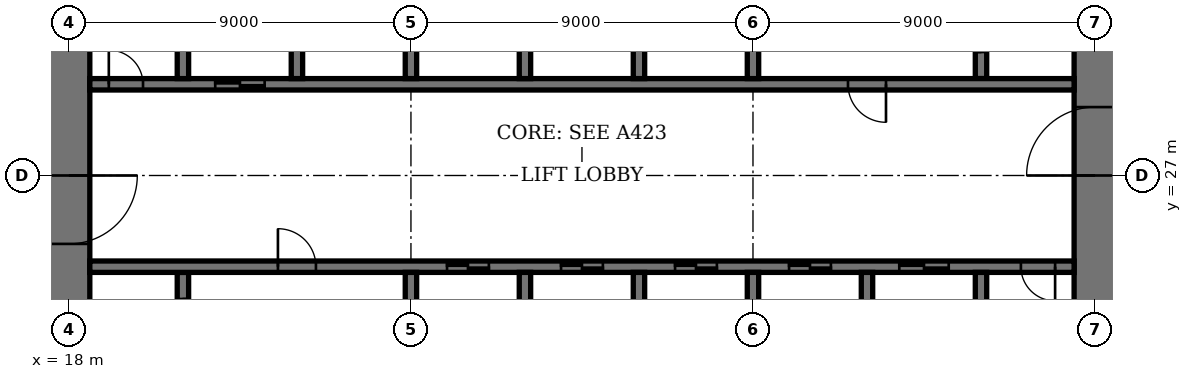
"""IFC4 building model, lengths in metres.
Left out: names, types, materials, properties, quantities, classifications, styles, units other than length and angle.
Written with IfcOpenShell. Run it as: python <this file> out.ifc"""

import sys

from ifc_helpers import new_model, si_unit, direction, frame, frame_2d, origin, place, context, subcontext, project, spatial, rectangle, extrude, element, fill, save


model = new_model("IFC4")
c1 = context("Model", 3, precision=1e-05, world=origin(), true_north=direction((0.0, 1.0)))
c2 = subcontext(c1, "Body", "Model", "MODEL_VIEW")
j1 = project(units=[si_unit("LENGTHUNIT", "METRE"), si_unit("PLANEANGLEUNIT", "RADIAN")], contexts=[c1])
p1 = place(None, origin())
s1 = spatial("IfcSite", under=j1, at=p1, CompositionType="ELEMENT")
p2 = place(p1, origin())
s2 = spatial("IfcBuilding", under=s1, at=p2, CompositionType="ELEMENT")
p3 = place(p2, frame((0.0, 0.0, 5.4)))
s3 = spatial("IfcBuildingStorey", under=s2, at=p3, CompositionType="ELEMENT", Elevation=5.4)
p4 = place(p3, frame((18.0, 35.45, 0.0), z_axis=(0.0, 0.0, 1.0), x_axis=(0.0, -1.0, 0.0)))
e1 = element("IfcWall", 1, at=p4, inside=s3, PredefinedType="SHEAR", context=c2, shape_type="SweptSolid", body=[
    extrude(rectangle(XDim=16.9, YDim=1.1, at=frame_2d((8.45, 0.0))), origin(), (0.0, 0.0, 1.0), 5.4),
])
p5 = place(p4, frame((8.45, 0.0, 0.0)))
e2 = element("IfcOpeningElement", 2, at=p5, cuts=e1, PredefinedType="OPENING", context=c2, shape_type="SweptSolid", body=[
    extrude(rectangle(XDim=1.8, YDim=2.4, at=frame_2d((0.9, 1.2))), frame((0.0, 0.56, 0.0), z_axis=(0.0, -1.0, 0.0), x_axis=(1.0, 0.0, 0.0)), (0.0, 0.0, 1.0), 1.12),
])
p6 = place(p3, frame((45.0, 18.55, 0.0), z_axis=(0.0, 0.0, 1.0), x_axis=(0.0, 1.0, 0.0)))
e3 = element("IfcWall", 3, at=p6, inside=s3, PredefinedType="SHEAR", context=c2, shape_type="SweptSolid", body=[
    extrude(rectangle(XDim=16.9, YDim=1.1, at=frame_2d((8.45, 0.0))), origin(), (0.0, 0.0, 1.0), 5.4),
])
p7 = place(p6, frame((8.45, 0.0, 0.0)))
e4 = element("IfcOpeningElement", 4, at=p7, cuts=e3, PredefinedType="OPENING", context=c2, shape_type="SweptSolid", body=[
    extrude(rectangle(XDim=1.8, YDim=2.4, at=frame_2d((0.9, 1.2))), frame((0.0, 0.56, 0.0), z_axis=(0.0, -1.0, 0.0), x_axis=(1.0, 0.0, 0.0)), (0.0, 0.0, 1.0), 1.12),
])
p8 = place(p3, frame((21.0, 21.95, 0.0), z_axis=(0.0, 0.0, 1.0), x_axis=(0.0, 1.0, 0.0)))
e5 = element("IfcWall", 5, at=p8, inside=s3, PredefinedType="SHEAR", context=c2, shape_type="SweptSolid", body=[
    extrude(rectangle(XDim=2.5, YDim=0.3, at=frame_2d((1.25, 0.0))), origin(), (0.0, 0.0, 1.0), 5.4),
])
p9 = place(p8, frame((0.7, 0.0, 0.0)))
e6 = element("IfcOpeningElement", 6, at=p9, cuts=e5, PredefinedType="OPENING", context=c2, shape_type="SweptSolid", body=[
    extrude(rectangle(XDim=1.1, YDim=2.4, at=frame_2d((0.55, 1.2))), frame((0.0, 0.16, 0.0), z_axis=(0.0, -1.0, 0.0), x_axis=(1.0, 0.0, 0.0)), (0.0, 0.0, 1.0), 0.32),
])
p10 = place(p3, frame((42.0, 29.55, 0.0), z_axis=(0.0, 0.0, 1.0), x_axis=(0.0, 1.0, 0.0)))
e7 = element("IfcWall", 7, at=p10, inside=s3, PredefinedType="SHEAR", context=c2, shape_type="SweptSolid", body=[
    extrude(rectangle(XDim=2.5, YDim=0.3, at=frame_2d((1.25, 0.0))), origin(), (0.0, 0.0, 1.0), 5.4),
])
p11 = place(p10, frame((0.7, 0.0, 0.0)))
e8 = element("IfcOpeningElement", 8, at=p11, cuts=e7, PredefinedType="OPENING", context=c2, shape_type="SweptSolid", body=[
    extrude(rectangle(XDim=1.1, YDim=2.4, at=frame_2d((0.55, 1.2))), frame((0.0, 0.16, 0.0), z_axis=(0.0, -1.0, 0.0), x_axis=(1.0, 0.0, 0.0)), (0.0, 0.0, 1.0), 0.32),
])
p12 = place(p3, frame((18.55, 24.6, 0.0), z_axis=(0.0, 0.0, 1.0), x_axis=(1.0, 0.0, 0.0)))
e9 = element("IfcWall", 9, at=p12, inside=s3, PredefinedType="SHEAR", context=c2, shape_type="SweptSolid", body=[
    extrude(rectangle(XDim=25.9, YDim=0.3, at=frame_2d((12.95, 0.0))), origin(), (0.0, 0.0, 1.0), 5.4),
])
p13 = place(p12, frame((4.95, 0.0, 0.0)))
e10 = element("IfcOpeningElement", 10, at=p13, cuts=e9, PredefinedType="OPENING", context=c2, shape_type="SweptSolid", body=[
    extrude(rectangle(XDim=1.0, YDim=2.4, at=frame_2d((0.5, 1.2))), frame((0.0, 0.16, 0.0), z_axis=(0.0, -1.0, 0.0), x_axis=(1.0, 0.0, 0.0)), (0.0, 0.0, 1.0), 0.32),
])
p14 = place(p12, frame((24.5, 0.0, 0.0)))
e11 = element("IfcOpeningElement", 11, at=p14, cuts=e9, PredefinedType="OPENING", context=c2, shape_type="SweptSolid", body=[
    extrude(rectangle(XDim=0.9, YDim=2.1, at=frame_2d((0.45, 1.05))), frame((0.0, 0.16, 0.0), z_axis=(0.0, -1.0, 0.0), x_axis=(1.0, 0.0, 0.0)), (0.0, 0.0, 1.0), 0.32),
])
p15 = place(p12, frame((9.4, 0.0, 0.0)))
e12 = element("IfcOpeningElement", 12, at=p15, cuts=e9, PredefinedType="OPENING", context=c2, shape_type="SweptSolid", body=[
    extrude(rectangle(XDim=1.1, YDim=2.4, at=frame_2d((0.55, 1.2))), frame((0.0, 0.16, 0.0), z_axis=(0.0, -1.0, 0.0), x_axis=(1.0, 0.0, 0.0)), (0.0, 0.0, 1.0), 0.32),
])
p16 = place(p12, frame((12.4, 0.0, 0.0)))
e13 = element("IfcOpeningElement", 13, at=p16, cuts=e9, PredefinedType="OPENING", context=c2, shape_type="SweptSolid", body=[
    extrude(rectangle(XDim=1.1, YDim=2.4, at=frame_2d((0.55, 1.2))), frame((0.0, 0.16, 0.0), z_axis=(0.0, -1.0, 0.0), x_axis=(1.0, 0.0, 0.0)), (0.0, 0.0, 1.0), 0.32),
])
p17 = place(p12, frame((15.4, 0.0, 0.0)))
e14 = element("IfcOpeningElement", 14, at=p17, cuts=e9, PredefinedType="OPENING", context=c2, shape_type="SweptSolid", body=[
    extrude(rectangle(XDim=1.1, YDim=2.4, at=frame_2d((0.55, 1.2))), frame((0.0, 0.16, 0.0), z_axis=(0.0, -1.0, 0.0), x_axis=(1.0, 0.0, 0.0)), (0.0, 0.0, 1.0), 0.32),
])
p18 = place(p12, frame((18.4, 0.0, 0.0)))
e15 = element("IfcOpeningElement", 15, at=p18, cuts=e9, PredefinedType="OPENING", context=c2, shape_type="SweptSolid", body=[
    extrude(rectangle(XDim=1.1, YDim=2.4, at=frame_2d((0.55, 1.2))), frame((0.0, 0.16, 0.0), z_axis=(0.0, -1.0, 0.0), x_axis=(1.0, 0.0, 0.0)), (0.0, 0.0, 1.0), 0.32),
])
p19 = place(p12, frame((21.3, 0.0, 0.0)))
e16 = element("IfcOpeningElement", 16, at=p19, cuts=e9, PredefinedType="OPENING", context=c2, shape_type="SweptSolid", body=[
    extrude(rectangle(XDim=1.3, YDim=2.4, at=frame_2d((0.65, 1.2))), frame((0.0, 0.16, 0.0), z_axis=(0.0, -1.0, 0.0), x_axis=(1.0, 0.0, 0.0)), (0.0, 0.0, 1.0), 0.32),
])
p20 = place(p3, frame((18.55, 29.4, 0.0), z_axis=(0.0, 0.0, 1.0), x_axis=(1.0, 0.0, 0.0)))
e17 = element("IfcWall", 17, at=p20, inside=s3, PredefinedType="SHEAR", context=c2, shape_type="SweptSolid", body=[
    extrude(rectangle(XDim=25.9, YDim=0.3, at=frame_2d((12.95, 0.0))), origin(), (0.0, 0.0, 1.0), 5.4),
])
p21 = place(p20, frame((19.95, 0.0, 0.0)))
e18 = element("IfcOpeningElement", 18, at=p21, cuts=e17, PredefinedType="OPENING", context=c2, shape_type="SweptSolid", body=[
    extrude(rectangle(XDim=1.0, YDim=2.4, at=frame_2d((0.5, 1.2))), frame((0.0, 0.16, 0.0), z_axis=(0.0, -1.0, 0.0), x_axis=(1.0, 0.0, 0.0)), (0.0, 0.0, 1.0), 0.32),
])
p22 = place(p20, frame((0.5, 0.0, 0.0)))
e19 = element("IfcOpeningElement", 19, at=p22, cuts=e17, PredefinedType="OPENING", context=c2, shape_type="SweptSolid", body=[
    extrude(rectangle(XDim=0.9, YDim=2.1, at=frame_2d((0.45, 1.05))), frame((0.0, 0.16, 0.0), z_axis=(0.0, -1.0, 0.0), x_axis=(1.0, 0.0, 0.0)), (0.0, 0.0, 1.0), 0.32),
])
p23 = place(p20, frame((3.3, 0.0, 0.0)))
e20 = element("IfcOpeningElement", 20, at=p23, cuts=e17, PredefinedType="OPENING", context=c2, shape_type="SweptSolid", body=[
    extrude(rectangle(XDim=1.3, YDim=2.4, at=frame_2d((0.65, 1.2))), frame((0.0, 0.16, 0.0), z_axis=(0.0, -1.0, 0.0), x_axis=(1.0, 0.0, 0.0)), (0.0, 0.0, 1.0), 0.32),
])
for number, where, z_axis, x_axis in (
    (21, (30.0, 21.75, 0.0), (0.0, 0.0, 1.0), (0.0, 1.0, 0.0)),
    (22, (33.0, 29.55, 0.0), (0.0, 0.0, 1.0), (0.0, 1.0, 0.0)),
    (23, (33.0, 21.75, 0.0), (0.0, 0.0, 1.0), (0.0, 1.0, 0.0)),
    (24, (30.0, 29.55, 0.0), (0.0, 0.0, 1.0), (0.0, 1.0, 0.0)),
    (25, (36.0, 21.75, 0.0), (0.0, 0.0, 1.0), (0.0, 1.0, 0.0)),
    (26, (27.0, 29.55, 0.0), (0.0, 0.0, 1.0), (0.0, 1.0, 0.0)),
):
    element("IfcWall", number, at=place(p3, frame(where, z_axis=z_axis, x_axis=x_axis)), inside=s3, PredefinedType="SHEAR", context=c2, shape_type="SweptSolid", body=[
        extrude(rectangle(XDim=2.7, YDim=0.3, at=frame_2d((1.35, 0.0))), origin(), (0.0, 0.0, 1.0), 5.4),
    ])
for number, where, z_axis, x_axis in (
    (27, (39.0, 18.55, 0.0), (0.0, 0.0, 1.0), (0.0, 1.0, 0.0)),
    (28, (24.0, 29.55, 0.0), (0.0, 0.0, 1.0), (0.0, 1.0, 0.0)),
):
    element("IfcWall", number, at=place(p3, frame(where, z_axis=z_axis, x_axis=x_axis)), inside=s3, PredefinedType="SHEAR", context=c2, shape_type="SweptSolid", body=[
        extrude(rectangle(XDim=5.9, YDim=0.3, at=frame_2d((2.95, 0.0))), origin(), (0.0, 0.0, 1.0), 5.4),
    ])
for number, where, z_axis, x_axis in (
    (29, (42.0, 21.75, 0.0), (0.0, 0.0, 1.0), (0.0, 1.0, 0.0)),
    (30, (21.0, 29.55, 0.0), (0.0, 0.0, 1.0), (0.0, 1.0, 0.0)),
):
    element("IfcWall", number, at=place(p3, frame(where, z_axis=z_axis, x_axis=x_axis)), inside=s3, PredefinedType="SHEAR", context=c2, shape_type="SweptSolid", body=[
        extrude(rectangle(XDim=2.7, YDim=0.3, at=frame_2d((1.35, 0.0))), origin(), (0.0, 0.0, 1.0), 5.4),
    ])
for number, where, z_axis, x_axis in (
    (31, (27.0, 21.6, 0.0), (0.0, 0.0, 1.0), (0.0, 1.0, 0.0)),
    (32, (36.0, 29.55, 0.0), (0.0, 0.0, 1.0), (0.0, 1.0, 0.0)),
):
    element("IfcWall", number, at=place(p3, frame(where, z_axis=z_axis, x_axis=x_axis)), inside=s3, PredefinedType="SHEAR", context=c2, shape_type="SweptSolid", body=[
        extrude(rectangle(XDim=2.85, YDim=0.3, at=frame_2d((1.425, 0.0))), origin(), (0.0, 0.0, 1.0), 5.4),
    ])
p24 = place(p5, origin())
e33 = element("IfcDoor", 33, at=p24, inside=s3, OperationType="DOUBLE_DOOR_DOUBLE_SWING", PredefinedType="DOOR", context=c2, shape_type="SweptSolid", body=[
    extrude(rectangle(XDim=1.8, YDim=2.4, at=frame_2d((0.9, 1.2))), frame((0.0, 0.03, 0.0), z_axis=(0.0, -1.0, 0.0), x_axis=(1.0, 0.0, 0.0)), (0.0, 0.0, 1.0), 0.06),
    extrude(rectangle(XDim=0.04, YDim=2.4, at=frame_2d((0.02, 1.2))), frame((0.0, 0.55, 0.0), z_axis=(0.0, -1.0, 0.0), x_axis=(1.0, 0.0, 0.0)), (0.0, 0.0, 1.0), 1.1),
    extrude(rectangle(XDim=0.04, YDim=2.4, at=frame_2d((1.78, 1.2))), frame((0.0, 0.55, 0.0), z_axis=(0.0, -1.0, 0.0), x_axis=(1.0, 0.0, 0.0)), (0.0, 0.0, 1.0), 1.1),
    extrude(rectangle(XDim=1.8, YDim=0.04, at=frame_2d((0.9, 2.38))), frame((0.0, 0.55, 0.0), z_axis=(0.0, -1.0, 0.0), x_axis=(1.0, 0.0, 0.0)), (0.0, 0.0, 1.0), 1.1),
])
fill(e2, e33)
p25 = place(p7, origin())
e34 = element("IfcDoor", 34, at=p25, inside=s3, OperationType="DOUBLE_DOOR_DOUBLE_SWING", PredefinedType="DOOR", context=c2, shape_type="SweptSolid", body=[
    extrude(rectangle(XDim=1.8, YDim=2.4, at=frame_2d((0.9, 1.2))), frame((0.0, 0.03, 0.0), z_axis=(0.0, -1.0, 0.0), x_axis=(1.0, 0.0, 0.0)), (0.0, 0.0, 1.0), 0.06),
    extrude(rectangle(XDim=0.04, YDim=2.4, at=frame_2d((0.02, 1.2))), frame((0.0, 0.55, 0.0), z_axis=(0.0, -1.0, 0.0), x_axis=(1.0, 0.0, 0.0)), (0.0, 0.0, 1.0), 1.1),
    extrude(rectangle(XDim=0.04, YDim=2.4, at=frame_2d((1.78, 1.2))), frame((0.0, 0.55, 0.0), z_axis=(0.0, -1.0, 0.0), x_axis=(1.0, 0.0, 0.0)), (0.0, 0.0, 1.0), 1.1),
    extrude(rectangle(XDim=1.8, YDim=0.04, at=frame_2d((0.9, 2.38))), frame((0.0, 0.55, 0.0), z_axis=(0.0, -1.0, 0.0), x_axis=(1.0, 0.0, 0.0)), (0.0, 0.0, 1.0), 1.1),
])
fill(e4, e34)
p26 = place(p13, origin())
e35 = element("IfcDoor", 35, at=p26, inside=s3, OperationType="SINGLE_SWING_RIGHT", PredefinedType="DOOR", context=c2, shape_type="SweptSolid", body=[
    extrude(rectangle(XDim=1.0, YDim=2.4, at=frame_2d((0.5, 1.2))), frame((0.0, 0.03, 0.0), z_axis=(0.0, -1.0, 0.0), x_axis=(1.0, 0.0, 0.0)), (0.0, 0.0, 1.0), 0.06),
])
fill(e10, e35)
p27 = place(p21, origin())
e36 = element("IfcDoor", 36, at=p27, inside=s3, OperationType="SINGLE_SWING_RIGHT", PredefinedType="DOOR", context=c2, shape_type="SweptSolid", body=[
    extrude(rectangle(XDim=1.0, YDim=2.4, at=frame_2d((0.5, 1.2))), frame((0.0, 0.03, 0.0), z_axis=(0.0, -1.0, 0.0), x_axis=(1.0, 0.0, 0.0)), (0.0, 0.0, 1.0), 0.06),
])
fill(e18, e36)
p28 = place(p14, origin())
e37 = element("IfcDoor", 37, at=p28, inside=s3, OperationType="SINGLE_SWING_RIGHT", PredefinedType="DOOR", context=c2, shape_type="SweptSolid", body=[
    extrude(rectangle(XDim=0.9, YDim=2.1, at=frame_2d((0.45, 1.05))), frame((0.0, 0.03, 0.0), z_axis=(0.0, -1.0, 0.0), x_axis=(1.0, 0.0, 0.0)), (0.0, 0.0, 1.0), 0.06),
])
fill(e11, e37)
p29 = place(p22, origin())
e38 = element("IfcDoor", 38, at=p29, inside=s3, OperationType="SINGLE_SWING_RIGHT", PredefinedType="DOOR", context=c2, shape_type="SweptSolid", body=[
    extrude(rectangle(XDim=0.9, YDim=2.1, at=frame_2d((0.45, 1.05))), frame((0.0, 0.03, 0.0), z_axis=(0.0, -1.0, 0.0), x_axis=(1.0, 0.0, 0.0)), (0.0, 0.0, 1.0), 0.06),
])
fill(e19, e38)
p30 = place(p15, origin())
e39 = element("IfcDoor", 39, at=p30, inside=s3, OperationType="DOUBLE_DOOR_SLIDING", PredefinedType="DOOR", context=c2, shape_type="SweptSolid", body=[
    extrude(rectangle(XDim=1.1, YDim=2.4, at=frame_2d((0.55, 1.2))), frame((0.0, 0.02, 0.0), z_axis=(0.0, -1.0, 0.0), x_axis=(1.0, 0.0, 0.0)), (0.0, 0.0, 1.0), 0.04),
])
fill(e12, e39)
p31 = place(p16, origin())
e40 = element("IfcDoor", 40, at=p31, inside=s3, OperationType="DOUBLE_DOOR_SLIDING", PredefinedType="DOOR", context=c2, shape_type="SweptSolid", body=[
    extrude(rectangle(XDim=1.1, YDim=2.4, at=frame_2d((0.55, 1.2))), frame((0.0, 0.02, 0.0), z_axis=(0.0, -1.0, 0.0), x_axis=(1.0, 0.0, 0.0)), (0.0, 0.0, 1.0), 0.04),
])
fill(e13, e40)
p32 = place(p17, origin())
e41 = element("IfcDoor", 41, at=p32, inside=s3, OperationType="DOUBLE_DOOR_SLIDING", PredefinedType="DOOR", context=c2, shape_type="SweptSolid", body=[
    extrude(rectangle(XDim=1.1, YDim=2.4, at=frame_2d((0.55, 1.2))), frame((0.0, 0.02, 0.0), z_axis=(0.0, -1.0, 0.0), x_axis=(1.0, 0.0, 0.0)), (0.0, 0.0, 1.0), 0.04),
])
fill(e14, e41)
p33 = place(p18, origin())
e42 = element("IfcDoor", 42, at=p33, inside=s3, OperationType="DOUBLE_DOOR_SLIDING", PredefinedType="DOOR", context=c2, shape_type="SweptSolid", body=[
    extrude(rectangle(XDim=1.1, YDim=2.4, at=frame_2d((0.55, 1.2))), frame((0.0, 0.02, 0.0), z_axis=(0.0, -1.0, 0.0), x_axis=(1.0, 0.0, 0.0)), (0.0, 0.0, 1.0), 0.04),
])
fill(e15, e42)
p34 = place(p19, origin())
e43 = element("IfcDoor", 43, at=p34, inside=s3, OperationType="DOUBLE_DOOR_SLIDING", PredefinedType="DOOR", context=c2, shape_type="SweptSolid", body=[
    extrude(rectangle(XDim=1.3, YDim=2.4, at=frame_2d((0.65, 1.2))), frame((0.0, 0.02, 0.0), z_axis=(0.0, -1.0, 0.0), x_axis=(1.0, 0.0, 0.0)), (0.0, 0.0, 1.0), 0.04),
])
fill(e16, e43)
p35 = place(p23, origin())
e44 = element("IfcDoor", 44, at=p35, inside=s3, OperationType="DOUBLE_DOOR_SLIDING", PredefinedType="DOOR", context=c2, shape_type="SweptSolid", body=[
    extrude(rectangle(XDim=1.3, YDim=2.4, at=frame_2d((0.65, 1.2))), frame((0.0, 0.02, 0.0), z_axis=(0.0, -1.0, 0.0), x_axis=(1.0, 0.0, 0.0)), (0.0, 0.0, 1.0), 0.04),
])
fill(e20, e44)
save(model, sys.argv[1])
